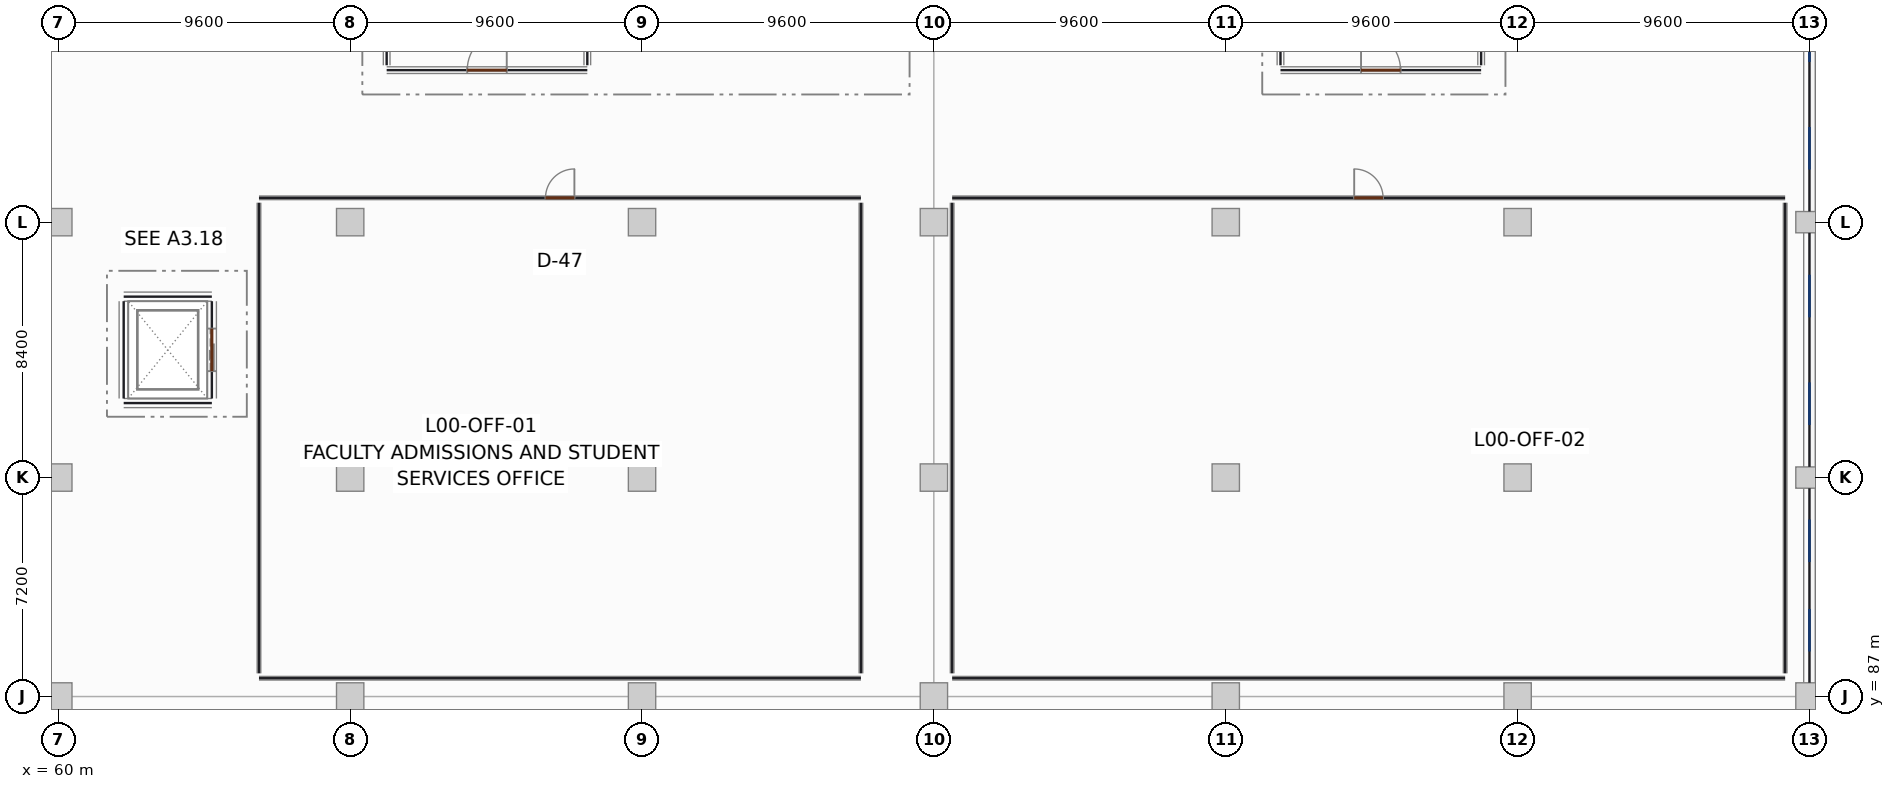
"""IFC4 building model, lengths in metres.
Left out: names, types, materials, properties, quantities, classifications, styles, units other than length and angle.
Written with IfcOpenShell. Run it as: python <this file> out.ifc"""

import sys

from ifc_helpers import new_model, si_unit, direction, frame, frame_2d, origin, origin_2d, place, context, subcontext, project, spatial, rectangle, extrude, element, fill, save


model = new_model("IFC4")
c1 = context("Model", 3, precision=1e-05, world=origin(), true_north=direction((0.0, 1.0)))
c2 = subcontext(c1, "Body", "Model", "MODEL_VIEW")
j1 = project(units=[si_unit("LENGTHUNIT", "METRE"), si_unit("PLANEANGLEUNIT", "RADIAN")], contexts=[c1])
p1 = place(None, origin())
s1 = spatial("IfcSite", under=j1, at=p1, CompositionType="ELEMENT")
p2 = place(p1, origin())
s2 = spatial("IfcBuilding", under=s1, at=p2, CompositionType="ELEMENT")
p3 = place(p2, origin())
s3 = spatial("IfcBuildingStorey", under=s2, at=p3, CompositionType="ELEMENT", Elevation=0.0)
for number, where, z_axis, x_axis in (
    (1, (60.0, 87.0, 0.0), (0.0, 0.0, 1.0), (1.0, 0.0, 0.0)),
    (2, (60.0, 94.2, 0.0), (0.0, 0.0, 1.0), (1.0, 0.0, 0.0)),
    (3, (60.0, 102.6, 0.0), (0.0, 0.0, 1.0), (1.0, 0.0, 0.0)),
    (4, (69.6, 87.0, 0.0), (0.0, 0.0, 1.0), (1.0, 0.0, 0.0)),
    (5, (69.6, 94.2, 0.0), (0.0, 0.0, 1.0), (1.0, 0.0, 0.0)),
    (6, (69.6, 102.6, 0.0), (0.0, 0.0, 1.0), (1.0, 0.0, 0.0)),
    (7, (79.2, 87.0, 0.0), (0.0, 0.0, 1.0), (1.0, 0.0, 0.0)),
    (8, (79.2, 94.2, 0.0), (0.0, 0.0, 1.0), (1.0, 0.0, 0.0)),
    (9, (79.2, 102.6, 0.0), (0.0, 0.0, 1.0), (1.0, 0.0, 0.0)),
    (10, (88.8, 87.0, 0.0), (0.0, 0.0, 1.0), (1.0, 0.0, 0.0)),
    (11, (88.8, 94.2, 0.0), (0.0, 0.0, 1.0), (1.0, 0.0, 0.0)),
    (12, (88.8, 102.6, 0.0), (0.0, 0.0, 1.0), (1.0, 0.0, 0.0)),
    (13, (98.4, 87.0, 0.0), (0.0, 0.0, 1.0), (1.0, 0.0, 0.0)),
    (14, (98.4, 94.2, 0.0), (0.0, 0.0, 1.0), (1.0, 0.0, 0.0)),
    (15, (98.4, 102.6, 0.0), (0.0, 0.0, 1.0), (1.0, 0.0, 0.0)),
    (16, (108.0, 87.0, 0.0), (0.0, 0.0, 1.0), (1.0, 0.0, 0.0)),
    (17, (108.0, 94.2, 0.0), (0.0, 0.0, 1.0), (1.0, 0.0, 0.0)),
    (18, (108.0, 102.6, 0.0), (0.0, 0.0, 1.0), (1.0, 0.0, 0.0)),
    (19, (117.6, 87.0, 0.0), (0.0, 0.0, 1.0), (1.0, 0.0, 0.0)),
):
    element("IfcColumn", number, at=place(p3, frame(where, z_axis=z_axis, x_axis=x_axis)), inside=s3, PredefinedType="COLUMN", context=c2, shape_type="SweptSolid", body=[
        extrude(rectangle(XDim=0.9, YDim=0.9, at=origin_2d()), origin(), (0.0, 0.0, 1.0), 5.08),
    ])
for number, where, z_axis, x_axis in (
    (20, (117.6, 94.2, 0.0), (0.0, 0.0, 1.0), (1.0, 0.0, 0.0)),
    (21, (117.6, 102.6, 0.0), (0.0, 0.0, 1.0), (1.0, 0.0, 0.0)),
):
    element("IfcColumn", number, at=place(p3, frame(where, z_axis=z_axis, x_axis=x_axis)), inside=s3, PredefinedType="COLUMN", context=c2, shape_type="SweptSolid", body=[
        extrude(rectangle(XDim=0.9, YDim=0.7, at=origin_2d()), origin(), (0.0, 0.0, 1.0), 5.08),
    ])
p4 = place(p3, frame((117.6, 87.452, 0.0), z_axis=(0.0, 0.0, 1.0), x_axis=(0.0, 1.0, 0.0)))
e22 = element("IfcWall", 22, at=p4, inside=s3, PredefinedType="SOLIDWALL", context=c2, shape_type="SweptSolid", body=[
    extrude(rectangle(XDim=6.396, YDim=0.38, at=frame_2d((3.198, 0.0))), origin(), (0.0, 0.0, 1.0), 4.28),
])
p5 = place(p4, frame((1.027, 0.0, 0.85)))
e23 = element("IfcOpeningElement", 23, at=p5, cuts=e22, PredefinedType="OPENING", context=c2, shape_type="SweptSolid", body=[
    extrude(rectangle(XDim=1.4, YDim=1.65, at=frame_2d((0.7, 0.825))), frame((0.0, 0.2, 0.0), z_axis=(0.0, -1.0, 0.0), x_axis=(1.0, 0.0, 0.0)), (0.0, 0.0, 1.0), 0.4),
])
p6 = place(p4, frame((3.969, 0.0, 0.85)))
e24 = element("IfcOpeningElement", 24, at=p6, cuts=e22, PredefinedType="OPENING", context=c2, shape_type="SweptSolid", body=[
    extrude(rectangle(XDim=1.4, YDim=1.65, at=frame_2d((0.7, 0.825))), frame((0.0, 0.2, 0.0), z_axis=(0.0, -1.0, 0.0), x_axis=(1.0, 0.0, 0.0)), (0.0, 0.0, 1.0), 0.4),
])
p7 = place(p3, frame((117.6, 94.552, 0.0), z_axis=(0.0, 0.0, 1.0), x_axis=(0.0, 1.0, 0.0)))
e25 = element("IfcWall", 25, at=p7, inside=s3, PredefinedType="SOLIDWALL", context=c2, shape_type="SweptSolid", body=[
    extrude(rectangle(XDim=7.696, YDim=0.38, at=frame_2d((3.848, 0.0))), origin(), (0.0, 0.0, 1.0), 4.28),
])
p8 = place(p7, frame((1.378, 0.0, 0.85)))
e26 = element("IfcOpeningElement", 26, at=p8, cuts=e25, PredefinedType="OPENING", context=c2, shape_type="SweptSolid", body=[
    extrude(rectangle(XDim=1.4, YDim=1.65, at=frame_2d((0.7, 0.825))), frame((0.0, 0.2, 0.0), z_axis=(0.0, -1.0, 0.0), x_axis=(1.0, 0.0, 0.0)), (0.0, 0.0, 1.0), 0.4),
])
p9 = place(p7, frame((4.918, 0.0, 0.85)))
e27 = element("IfcOpeningElement", 27, at=p9, cuts=e25, PredefinedType="OPENING", context=c2, shape_type="SweptSolid", body=[
    extrude(rectangle(XDim=1.4, YDim=1.65, at=frame_2d((0.7, 0.825))), frame((0.0, 0.2, 0.0), z_axis=(0.0, -1.0, 0.0), x_axis=(1.0, 0.0, 0.0)), (0.0, 0.0, 1.0), 0.4),
])
p10 = place(p3, frame((117.6, 102.952, 0.0), z_axis=(0.0, 0.0, 1.0), x_axis=(0.0, 1.0, 0.0)))
e28 = element("IfcWall", 28, at=p10, inside=s3, PredefinedType="SOLIDWALL", context=c2, shape_type="SweptSolid", body=[
    extrude(rectangle(XDim=7.696, YDim=0.38, at=frame_2d((3.848, 0.0))), origin(), (0.0, 0.0, 1.0), 4.28),
])
p11 = place(p10, frame((1.378, 0.0, 0.85)))
e29 = element("IfcOpeningElement", 29, at=p11, cuts=e28, PredefinedType="OPENING", context=c2, shape_type="SweptSolid", body=[
    extrude(rectangle(XDim=1.4, YDim=1.65, at=frame_2d((0.7, 0.825))), frame((0.0, 0.2, 0.0), z_axis=(0.0, -1.0, 0.0), x_axis=(1.0, 0.0, 0.0)), (0.0, 0.0, 1.0), 0.4),
])
p12 = place(p10, frame((4.918, 0.0, 0.85)))
e30 = element("IfcOpeningElement", 30, at=p12, cuts=e28, PredefinedType="OPENING", context=c2, shape_type="SweptSolid", body=[
    extrude(rectangle(XDim=1.4, YDim=1.65, at=frame_2d((0.7, 0.825))), frame((0.0, 0.2, 0.0), z_axis=(0.0, -1.0, 0.0), x_axis=(1.0, 0.0, 0.0)), (0.0, 0.0, 1.0), 0.4),
])
for number, where, z_axis, x_axis in (
    (31, (62.15, 96.65, 0.0), (0.0, 0.0, 1.0), (1.0, 0.0, 0.0)),
    (32, (62.15, 100.15, 0.0), (0.0, 0.0, 1.0), (1.0, 0.0, 0.0)),
):
    element("IfcWall", number, at=place(p3, frame(where, z_axis=z_axis, x_axis=x_axis)), inside=s3, PredefinedType="SHEAR", context=c2, shape_type="SweptSolid", body=[
        extrude(rectangle(XDim=2.9, YDim=0.3, at=frame_2d((1.45, 0.0))), origin(), (0.0, 0.0, 1.0), 5.08),
    ])
p13 = place(p3, frame((62.15, 96.8, 0.0), z_axis=(0.0, 0.0, 1.0), x_axis=(0.0, 1.0, 0.0)))
e33 = element("IfcWall", 33, at=p13, inside=s3, PredefinedType="SHEAR", context=c2, shape_type="SweptSolid", body=[
    extrude(rectangle(XDim=3.2, YDim=0.3, at=frame_2d((1.6, 0.0))), origin(), (0.0, 0.0, 1.0), 5.08),
])
p14 = place(p3, frame((65.05, 96.8, 0.0), z_axis=(0.0, 0.0, 1.0), x_axis=(0.0, 1.0, 0.0)))
e34 = element("IfcWall", 34, at=p14, inside=s3, PredefinedType="SHEAR", context=c2, shape_type="SweptSolid", body=[
    extrude(rectangle(XDim=3.2, YDim=0.3, at=frame_2d((1.6, 0.0))), origin(), (0.0, 0.0, 1.0), 5.08),
])
p15 = place(p14, frame((0.9, 0.0, 0.0)))
e35 = element("IfcOpeningElement", 35, at=p15, cuts=e34, PredefinedType="OPENING", context=c2, shape_type="SweptSolid", body=[
    extrude(rectangle(XDim=1.4, YDim=2.3, at=frame_2d((0.7, 1.15))), frame((0.0, 0.16, 0.0), z_axis=(0.0, -1.0, 0.0), x_axis=(1.0, 0.0, 0.0)), (0.0, 0.0, 1.0), 0.32),
])
p16 = place(p3, frame((70.8, 107.6, 0.0), z_axis=(0.0, 0.0, 1.0), x_axis=(1.0, 0.0, 0.0)))
e36 = element("IfcWall", 36, at=p16, inside=s3, PredefinedType="PARTITIONING", context=c2, shape_type="SweptSolid", body=[
    extrude(rectangle(XDim=6.6, YDim=0.22, at=frame_2d((3.3, 0.0))), origin(), (0.0, 0.0, 1.0), 4.12),
])
p17 = place(p16, frame((2.65, 0.0, 0.0)))
e37 = element("IfcOpeningElement", 37, at=p17, cuts=e36, PredefinedType="OPENING", context=c2, shape_type="SweptSolid", body=[
    extrude(rectangle(XDim=1.3, YDim=2.2, at=frame_2d((0.65, 1.1))), frame((0.0, 0.12, 0.0), z_axis=(0.0, -1.0, 0.0), x_axis=(1.0, 0.0, 0.0)), (0.0, 0.0, 1.0), 0.24),
])
for number, where, z_axis, x_axis in (
    (38, (70.8, 107.76, 0.0), (0.0, 0.0, 1.0), (0.0, 1.0, 0.0)),
    (39, (77.4, 107.76, 0.0), (0.0, 0.0, 1.0), (0.0, 1.0, 0.0)),
):
    element("IfcWall", number, at=place(p3, frame(where, z_axis=z_axis, x_axis=x_axis)), inside=s3, PredefinedType="PARTITIONING", context=c2, shape_type="SweptSolid", body=[
        extrude(rectangle(XDim=3.08, YDim=0.22, at=frame_2d((1.54, 0.0))), origin(), (0.0, 0.0, 1.0), 4.12),
    ])
p18 = place(p3, frame((100.2, 107.6, 0.0), z_axis=(0.0, 0.0, 1.0), x_axis=(1.0, 0.0, 0.0)))
e40 = element("IfcWall", 40, at=p18, inside=s3, PredefinedType="PARTITIONING", context=c2, shape_type="SweptSolid", body=[
    extrude(rectangle(XDim=6.6, YDim=0.22, at=frame_2d((3.3, 0.0))), origin(), (0.0, 0.0, 1.0), 4.12),
])
p19 = place(p18, frame((2.65, 0.0, 0.0)))
e41 = element("IfcOpeningElement", 41, at=p19, cuts=e40, PredefinedType="OPENING", context=c2, shape_type="SweptSolid", body=[
    extrude(rectangle(XDim=1.3, YDim=2.2, at=frame_2d((0.65, 1.1))), frame((0.0, 0.12, 0.0), z_axis=(0.0, -1.0, 0.0), x_axis=(1.0, 0.0, 0.0)), (0.0, 0.0, 1.0), 0.24),
])
for number, where, z_axis, x_axis in (
    (42, (100.2, 107.76, 0.0), (0.0, 0.0, 1.0), (0.0, 1.0, 0.0)),
    (43, (106.8, 107.76, 0.0), (0.0, 0.0, 1.0), (0.0, 1.0, 0.0)),
):
    element("IfcWall", number, at=place(p3, frame(where, z_axis=z_axis, x_axis=x_axis)), inside=s3, PredefinedType="PARTITIONING", context=c2, shape_type="SweptSolid", body=[
        extrude(rectangle(XDim=3.08, YDim=0.22, at=frame_2d((1.54, 0.0))), origin(), (0.0, 0.0, 1.0), 4.12),
    ])
p20 = place(p3, frame((66.6, 87.6, 0.0), z_axis=(0.0, 0.0, 1.0), x_axis=(1.0, 0.0, 0.0)))
e44 = element("IfcWall", 44, at=p20, inside=s3, PredefinedType="PARTITIONING", context=c2, shape_type="SweptSolid", body=[
    extrude(rectangle(XDim=19.8, YDim=0.12, at=frame_2d((9.9, 0.0))), origin(), (0.0, 0.0, 1.0), 4.12),
])
p21 = place(p3, frame((66.6, 103.4, 0.0), z_axis=(0.0, 0.0, 1.0), x_axis=(1.0, 0.0, 0.0)))
e45 = element("IfcWall", 45, at=p21, inside=s3, PredefinedType="PARTITIONING", context=c2, shape_type="SweptSolid", body=[
    extrude(rectangle(XDim=19.8, YDim=0.12, at=frame_2d((9.9, 0.0))), origin(), (0.0, 0.0, 1.0), 4.12),
])
p22 = place(p21, frame((9.425, 0.0, 0.0)))
e46 = element("IfcOpeningElement", 46, at=p22, cuts=e45, PredefinedType="OPENING", context=c2, shape_type="SweptSolid", body=[
    extrude(rectangle(XDim=0.95, YDim=2.15, at=frame_2d((0.475, 1.075))), frame((0.0, 0.07, 0.0), z_axis=(0.0, -1.0, 0.0), x_axis=(1.0, 0.0, 0.0)), (0.0, 0.0, 1.0), 0.14),
])
for number, where, z_axis, x_axis in (
    (47, (66.6, 87.76, 0.0), (0.0, 0.0, 1.0), (0.0, 1.0, 0.0)),
    (48, (86.4, 87.76, 0.0), (0.0, 0.0, 1.0), (0.0, 1.0, 0.0)),
):
    element("IfcWall", number, at=place(p3, frame(where, z_axis=z_axis, x_axis=x_axis)), inside=s3, PredefinedType="PARTITIONING", context=c2, shape_type="SweptSolid", body=[
        extrude(rectangle(XDim=15.48, YDim=0.12, at=frame_2d((7.74, 0.0))), origin(), (0.0, 0.0, 1.0), 4.12),
    ])
p23 = place(p3, frame((89.4, 87.6, 0.0), z_axis=(0.0, 0.0, 1.0), x_axis=(1.0, 0.0, 0.0)))
e49 = element("IfcWall", 49, at=p23, inside=s3, PredefinedType="PARTITIONING", context=c2, shape_type="SweptSolid", body=[
    extrude(rectangle(XDim=27.4, YDim=0.12, at=frame_2d((13.7, 0.0))), origin(), (0.0, 0.0, 1.0), 4.12),
])
p24 = place(p3, frame((89.4, 103.4, 0.0), z_axis=(0.0, 0.0, 1.0), x_axis=(1.0, 0.0, 0.0)))
e50 = element("IfcWall", 50, at=p24, inside=s3, PredefinedType="PARTITIONING", context=c2, shape_type="SweptSolid", body=[
    extrude(rectangle(XDim=27.4, YDim=0.12, at=frame_2d((13.7, 0.0))), origin(), (0.0, 0.0, 1.0), 4.12),
])
p25 = place(p24, frame((13.225, 0.0, 0.0)))
e51 = element("IfcOpeningElement", 51, at=p25, cuts=e50, PredefinedType="OPENING", context=c2, shape_type="SweptSolid", body=[
    extrude(rectangle(XDim=0.95, YDim=2.15, at=frame_2d((0.475, 1.075))), frame((0.0, 0.07, 0.0), z_axis=(0.0, -1.0, 0.0), x_axis=(1.0, 0.0, 0.0)), (0.0, 0.0, 1.0), 0.14),
])
for number, where, z_axis, x_axis in (
    (52, (89.4, 87.76, 0.0), (0.0, 0.0, 1.0), (0.0, 1.0, 0.0)),
    (53, (116.8, 87.76, 0.0), (0.0, 0.0, 1.0), (0.0, 1.0, 0.0)),
):
    element("IfcWall", number, at=place(p3, frame(where, z_axis=z_axis, x_axis=x_axis)), inside=s3, PredefinedType="PARTITIONING", context=c2, shape_type="SweptSolid", body=[
        extrude(rectangle(XDim=15.48, YDim=0.12, at=frame_2d((7.74, 0.0))), origin(), (0.0, 0.0, 1.0), 4.12),
    ])
p26 = place(p5, origin())
e54 = element("IfcWindow", 54, at=p26, inside=s3, PartitioningType="SINGLE_PANEL", PredefinedType="WINDOW", context=c2, shape_type="SweptSolid", body=[
    extrude(rectangle(XDim=1.4, YDim=1.65, at=frame_2d((0.7, 0.825))), frame((0.0, 0.03, 0.0), z_axis=(0.0, -1.0, 0.0), x_axis=(1.0, 0.0, 0.0)), (0.0, 0.0, 1.0), 0.06),
])
fill(e23, e54)
p27 = place(p6, origin())
e55 = element("IfcWindow", 55, at=p27, inside=s3, PartitioningType="SINGLE_PANEL", PredefinedType="WINDOW", context=c2, shape_type="SweptSolid", body=[
    extrude(rectangle(XDim=1.4, YDim=1.65, at=frame_2d((0.7, 0.825))), frame((0.0, 0.03, 0.0), z_axis=(0.0, -1.0, 0.0), x_axis=(1.0, 0.0, 0.0)), (0.0, 0.0, 1.0), 0.06),
])
fill(e24, e55)
p28 = place(p8, origin())
e56 = element("IfcWindow", 56, at=p28, inside=s3, PartitioningType="SINGLE_PANEL", PredefinedType="WINDOW", context=c2, shape_type="SweptSolid", body=[
    extrude(rectangle(XDim=1.4, YDim=1.65, at=frame_2d((0.7, 0.825))), frame((0.0, 0.03, 0.0), z_axis=(0.0, -1.0, 0.0), x_axis=(1.0, 0.0, 0.0)), (0.0, 0.0, 1.0), 0.06),
])
fill(e26, e56)
p29 = place(p9, origin())
e57 = element("IfcWindow", 57, at=p29, inside=s3, PartitioningType="SINGLE_PANEL", PredefinedType="WINDOW", context=c2, shape_type="SweptSolid", body=[
    extrude(rectangle(XDim=1.4, YDim=1.65, at=frame_2d((0.7, 0.825))), frame((0.0, 0.03, 0.0), z_axis=(0.0, -1.0, 0.0), x_axis=(1.0, 0.0, 0.0)), (0.0, 0.0, 1.0), 0.06),
])
fill(e27, e57)
p30 = place(p11, origin())
e58 = element("IfcWindow", 58, at=p30, inside=s3, PartitioningType="SINGLE_PANEL", PredefinedType="WINDOW", context=c2, shape_type="SweptSolid", body=[
    extrude(rectangle(XDim=1.4, YDim=1.65, at=frame_2d((0.7, 0.825))), frame((0.0, 0.03, 0.0), z_axis=(0.0, -1.0, 0.0), x_axis=(1.0, 0.0, 0.0)), (0.0, 0.0, 1.0), 0.06),
])
fill(e29, e58)
p31 = place(p12, origin())
e59 = element("IfcWindow", 59, at=p31, inside=s3, PartitioningType="SINGLE_PANEL", PredefinedType="WINDOW", context=c2, shape_type="SweptSolid", body=[
    extrude(rectangle(XDim=1.4, YDim=1.65, at=frame_2d((0.7, 0.825))), frame((0.0, 0.03, 0.0), z_axis=(0.0, -1.0, 0.0), x_axis=(1.0, 0.0, 0.0)), (0.0, 0.0, 1.0), 0.06),
])
fill(e30, e59)
p32 = place(p15, origin())
e60 = element("IfcDoor", 60, at=p32, inside=s3, OperationType="SLIDING_TO_LEFT", PredefinedType="DOOR", context=c2, shape_type="SweptSolid", body=[
    extrude(rectangle(XDim=1.4, YDim=2.3, at=frame_2d((0.7, 1.15))), frame((0.0, 0.025, 0.0), z_axis=(0.0, -1.0, 0.0), x_axis=(1.0, 0.0, 0.0)), (0.0, 0.0, 1.0), 0.05),
])
fill(e35, e60)
p33 = place(p17, origin())
e61 = element("IfcDoor", 61, at=p33, inside=s3, OperationType="SINGLE_SWING_RIGHT", PredefinedType="DOOR", context=c2, shape_type="SweptSolid", body=[
    extrude(rectangle(XDim=1.3, YDim=2.2, at=frame_2d((0.65, 1.1))), frame((0.0, 0.025, 0.0), z_axis=(0.0, -1.0, 0.0), x_axis=(1.0, 0.0, 0.0)), (0.0, 0.0, 1.0), 0.05),
])
fill(e37, e61)
p34 = place(p19, origin())
e62 = element("IfcDoor", 62, at=p34, inside=s3, OperationType="SINGLE_SWING_LEFT", PredefinedType="DOOR", context=c2, shape_type="SweptSolid", body=[
    extrude(rectangle(XDim=1.3, YDim=2.2, at=frame_2d((0.65, 1.1))), frame((0.0, 0.025, 0.0), z_axis=(0.0, -1.0, 0.0), x_axis=(1.0, 0.0, 0.0)), (0.0, 0.0, 1.0), 0.05),
])
fill(e41, e62)
p35 = place(p22, origin())
e63 = element("IfcDoor", 63, at=p35, inside=s3, OperationType="SINGLE_SWING_RIGHT", PredefinedType="DOOR", context=c2, shape_type="SweptSolid", body=[
    extrude(rectangle(XDim=0.95, YDim=2.15, at=frame_2d((0.475, 1.075))), frame((0.0, 0.025, 0.0), z_axis=(0.0, -1.0, 0.0), x_axis=(1.0, 0.0, 0.0)), (0.0, 0.0, 1.0), 0.05),
])
fill(e46, e63)
p36 = place(p25, origin())
e64 = element("IfcDoor", 64, at=p36, inside=s3, OperationType="SINGLE_SWING_LEFT", PredefinedType="DOOR", context=c2, shape_type="SweptSolid", body=[
    extrude(rectangle(XDim=0.95, YDim=2.15, at=frame_2d((0.475, 1.075))), frame((0.0, 0.025, 0.0), z_axis=(0.0, -1.0, 0.0), x_axis=(1.0, 0.0, 0.0)), (0.0, 0.0, 1.0), 0.05),
])
fill(e51, e64)
save(model, sys.argv[1])
